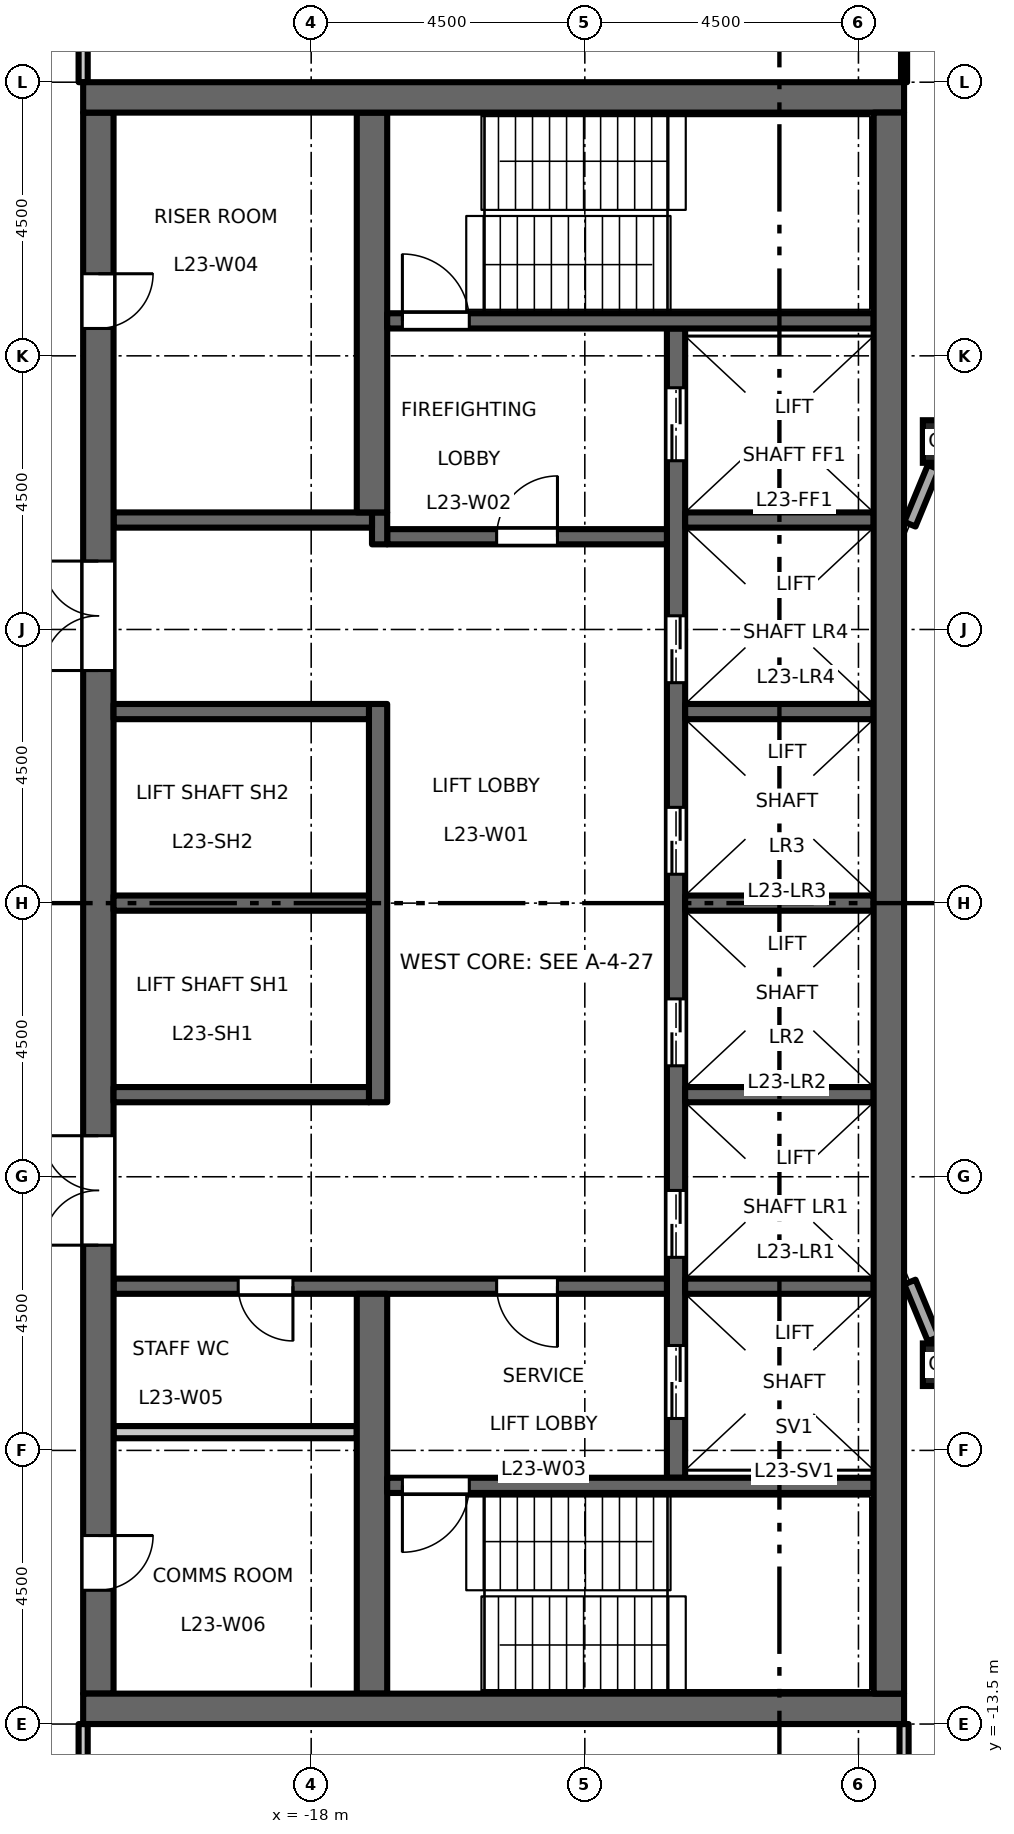
"""IFC4 building model, lengths in metres.
Left out: names, types, materials, properties, quantities, classifications, styles, units other than length and angle.
Written with IfcOpenShell. Run it as: python <this file> out.ifc"""

import sys

from ifc_helpers import new_model, si_unit, direction, frame, frame_2d, origin, origin_2d, place, context, subcontext, project, spatial, rectangle, hollow_rectangle, extrude, element, fill, save


model = new_model("IFC4")
c1 = context("Model", 3, precision=1e-05, world=origin(), true_north=direction((0.0, 1.0)))
c2 = subcontext(c1, "Body", "Model", "MODEL_VIEW")
j1 = project(units=[si_unit("LENGTHUNIT", "METRE"), si_unit("PLANEANGLEUNIT", "RADIAN")], contexts=[c1])
p1 = place(None, origin())
s1 = spatial("IfcSite", under=j1, at=p1, CompositionType="ELEMENT")
p2 = place(p1, origin())
s2 = spatial("IfcBuilding", under=s1, at=p2, CompositionType="ELEMENT")
p3 = place(p2, frame((0.0, 0.0, 109.2)))
s3 = spatial("IfcBuildingStorey", under=s2, at=p3, CompositionType="ELEMENT", Elevation=109.2)
for number, where, z_axis, x_axis in (
    (1, (-7.591, -7.591, 0.0), (0.0, 0.0, 1.0), (1.0, 0.0, 0.0)),
    (2, (-7.591, 7.591, 0.0), (0.0, 0.0, 1.0), (1.0, 0.0, 0.0)),
):
    element("IfcColumn", number, at=place(p3, frame(where, z_axis=z_axis, x_axis=x_axis)), inside=s3, PredefinedType="COLUMN", context=c2, shape_type="SweptSolid", body=[
        extrude(hollow_rectangle(XDim=0.7, YDim=0.7, WallThickness=0.04, at=origin_2d()), origin(), (0.0, 0.0, 1.0), 4.5),
    ])
p4 = place(p3, frame((-12.0, -9.45, 0.0), z_axis=(0.0, 0.0, 1.0), x_axis=(0.0, 1.0, 0.0)))
e3 = element("IfcWall", 3, at=p4, inside=s3, PredefinedType="SHEAR", context=c2, shape_type="SweptSolid", body=[
    extrude(rectangle(XDim=18.9, YDim=0.3, at=frame_2d((9.45, 0.0))), origin(), (0.0, 0.0, 1.0), 4.35),
])
p5 = place(p4, frame((3.625, 0.0, 0.0)))
e4 = element("IfcOpeningElement", 4, at=p5, cuts=e3, PredefinedType="OPENING", context=c2, shape_type="SweptSolid", body=[
    extrude(rectangle(XDim=1.1, YDim=2.1, at=frame_2d((0.55, 1.05))), frame((0.0, 0.16, 0.0), z_axis=(0.0, -1.0, 0.0), x_axis=(1.0, 0.0, 0.0)), (0.0, 0.0, 1.0), 0.32),
])
p6 = place(p4, frame((6.775, 0.0, 0.0)))
e5 = element("IfcOpeningElement", 5, at=p6, cuts=e3, PredefinedType="OPENING", context=c2, shape_type="SweptSolid", body=[
    extrude(rectangle(XDim=1.1, YDim=2.1, at=frame_2d((0.55, 1.05))), frame((0.0, 0.16, 0.0), z_axis=(0.0, -1.0, 0.0), x_axis=(1.0, 0.0, 0.0)), (0.0, 0.0, 1.0), 0.32),
])
p7 = place(p4, frame((9.925, 0.0, 0.0)))
e6 = element("IfcOpeningElement", 6, at=p7, cuts=e3, PredefinedType="OPENING", context=c2, shape_type="SweptSolid", body=[
    extrude(rectangle(XDim=1.1, YDim=2.1, at=frame_2d((0.55, 1.05))), frame((0.0, 0.16, 0.0), z_axis=(0.0, -1.0, 0.0), x_axis=(1.0, 0.0, 0.0)), (0.0, 0.0, 1.0), 0.32),
])
p8 = place(p4, frame((13.075, 0.0, 0.0)))
e7 = element("IfcOpeningElement", 7, at=p8, cuts=e3, PredefinedType="OPENING", context=c2, shape_type="SweptSolid", body=[
    extrude(rectangle(XDim=1.1, YDim=2.1, at=frame_2d((0.55, 1.05))), frame((0.0, 0.16, 0.0), z_axis=(0.0, -1.0, 0.0), x_axis=(1.0, 0.0, 0.0)), (0.0, 0.0, 1.0), 0.32),
])
p9 = place(p4, frame((16.725, 0.0, 0.0)))
e8 = element("IfcOpeningElement", 8, at=p9, cuts=e3, PredefinedType="OPENING", context=c2, shape_type="SweptSolid", body=[
    extrude(rectangle(XDim=1.2, YDim=2.1, at=frame_2d((0.6, 1.05))), frame((0.0, 0.16, 0.0), z_axis=(0.0, -1.0, 0.0), x_axis=(1.0, 0.0, 0.0)), (0.0, 0.0, 1.0), 0.32),
])
p10 = place(p4, frame((0.975, 0.0, 0.0)))
e9 = element("IfcOpeningElement", 9, at=p10, cuts=e3, PredefinedType="OPENING", context=c2, shape_type="SweptSolid", body=[
    extrude(rectangle(XDim=1.2, YDim=2.1, at=frame_2d((0.6, 1.05))), frame((0.0, 0.16, 0.0), z_axis=(0.0, -1.0, 0.0), x_axis=(1.0, 0.0, 0.0)), (0.0, 0.0, 1.0), 0.32),
])
p11 = place(p3, frame((-12.15, 6.025, 0.0), z_axis=(0.0, 0.0, 1.0), x_axis=(-1.0, 0.0, 0.0)))
e10 = element("IfcWall", 10, at=p11, inside=s3, PredefinedType="SHEAR", context=c2, shape_type="SweptSolid", body=[
    extrude(rectangle(XDim=4.6, YDim=0.25, at=frame_2d((2.3, 0.0))), origin(), (0.0, 0.0, 1.0), 4.35),
])
p12 = place(p11, frame((1.8, 0.0, 0.0)))
e11 = element("IfcOpeningElement", 11, at=p12, cuts=e10, PredefinedType="OPENING", context=c2, shape_type="SweptSolid", body=[
    extrude(rectangle(XDim=1.0, YDim=2.1, at=frame_2d((0.5, 1.05))), frame((0.0, 0.135, 0.0), z_axis=(0.0, -1.0, 0.0), x_axis=(1.0, 0.0, 0.0)), (0.0, 0.0, 1.0), 0.27),
])
p13 = place(p3, frame((-16.875, 5.9, 0.0), z_axis=(0.0, 0.0, 1.0), x_axis=(0.0, 1.0, 0.0)))
e12 = element("IfcWall", 12, at=p13, inside=s3, PredefinedType="SHEAR", context=c2, shape_type="SweptSolid", body=[
    extrude(rectangle(XDim=0.525, YDim=0.25, at=frame_2d((0.263, 0.0))), origin(), (0.0, 0.0, 1.0), 4.35),
])
p14 = place(p3, frame((-17.0, 6.3, 0.0), z_axis=(0.0, 0.0, 1.0), x_axis=(-1.0, 0.0, 0.0)))
e13 = element("IfcWall", 13, at=p14, inside=s3, PredefinedType="SHEAR", context=c2, shape_type="SweptSolid", body=[
    extrude(rectangle(XDim=4.25, YDim=0.25, at=frame_2d((2.125, 0.0))), origin(), (0.0, 0.0, 1.0), 4.35),
])
p15 = place(p3, frame((-12.15, -6.3, 0.0), z_axis=(0.0, 0.0, 1.0), x_axis=(-1.0, 0.0, 0.0)))
e14 = element("IfcWall", 14, at=p15, inside=s3, PredefinedType="SHEAR", context=c2, shape_type="SweptSolid", body=[
    extrude(rectangle(XDim=9.1, YDim=0.25, at=frame_2d((4.55, 0.0))), origin(), (0.0, 0.0, 1.0), 4.35),
])
p16 = place(p15, frame((1.8, 0.0, 0.0)))
e15 = element("IfcOpeningElement", 15, at=p16, cuts=e14, PredefinedType="OPENING", context=c2, shape_type="SweptSolid", body=[
    extrude(rectangle(XDim=1.0, YDim=2.1, at=frame_2d((0.5, 1.05))), frame((0.0, 0.135, 0.0), z_axis=(0.0, -1.0, 0.0), x_axis=(1.0, 0.0, 0.0)), (0.0, 0.0, 1.0), 0.27),
])
p17 = place(p15, frame((6.15, 0.0, 0.0)))
e16 = element("IfcOpeningElement", 16, at=p17, cuts=e14, PredefinedType="OPENING", context=c2, shape_type="SweptSolid", body=[
    extrude(rectangle(XDim=0.9, YDim=2.1, at=frame_2d((0.45, 1.05))), frame((0.0, 0.135, 0.0), z_axis=(0.0, -1.0, 0.0), x_axis=(1.0, 0.0, 0.0)), (0.0, 0.0, 1.0), 0.27),
])
p18 = place(p3, frame((-21.5, -13.0, 0.0), z_axis=(0.0, 0.0, 1.0), x_axis=(0.0, 1.0, 0.0)))
e17 = element("IfcWall", 17, at=p18, inside=s3, PredefinedType="SHEAR", context=c2, shape_type="SweptSolid", body=[
    extrude(rectangle(XDim=26.0, YDim=0.5, at=frame_2d((13.0, 0.0))), origin(), (0.0, 0.0, 1.0), 4.35),
])
p19 = place(p18, frame((16.825, 0.0, 0.0)))
e18 = element("IfcOpeningElement", 18, at=p19, cuts=e17, PredefinedType="OPENING", context=c2, shape_type="SweptSolid", body=[
    extrude(rectangle(XDim=1.8, YDim=2.1, at=frame_2d((0.9, 1.05))), frame((0.0, 0.26, 0.0), z_axis=(0.0, -1.0, 0.0), x_axis=(1.0, 0.0, 0.0)), (0.0, 0.0, 1.0), 0.52),
])
p20 = place(p18, frame((7.375, 0.0, 0.0)))
e19 = element("IfcOpeningElement", 19, at=p20, cuts=e17, PredefinedType="OPENING", context=c2, shape_type="SweptSolid", body=[
    extrude(rectangle(XDim=1.8, YDim=2.1, at=frame_2d((0.9, 1.05))), frame((0.0, 0.26, 0.0), z_axis=(0.0, -1.0, 0.0), x_axis=(1.0, 0.0, 0.0)), (0.0, 0.0, 1.0), 0.52),
])
p21 = place(p18, frame((22.45, 0.0, 0.0)))
e20 = element("IfcOpeningElement", 20, at=p21, cuts=e17, PredefinedType="OPENING", context=c2, shape_type="SweptSolid", body=[
    extrude(rectangle(XDim=0.9, YDim=2.1, at=frame_2d((0.45, 1.05))), frame((0.0, 0.26, 0.0), z_axis=(0.0, -1.0, 0.0), x_axis=(1.0, 0.0, 0.0)), (0.0, 0.0, 1.0), 0.52),
])
p22 = place(p18, frame((1.7, 0.0, 0.0)))
e21 = element("IfcOpeningElement", 21, at=p22, cuts=e17, PredefinedType="OPENING", context=c2, shape_type="SweptSolid", body=[
    extrude(rectangle(XDim=0.9, YDim=2.1, at=frame_2d((0.45, 1.05))), frame((0.0, 0.26, 0.0), z_axis=(0.0, -1.0, 0.0), x_axis=(1.0, 0.0, 0.0)), (0.0, 0.0, 1.0), 0.52),
])
p23 = place(p3, frame((-17.25, -8.7, 0.0), z_axis=(0.0, 0.0, 1.0), x_axis=(-1.0, 0.0, 0.0)))
e22 = element("IfcWall", 22, at=p23, inside=s3, PredefinedType="PARTITIONING", context=c2, shape_type="SweptSolid", body=[
    extrude(rectangle(XDim=4.0, YDim=0.2, at=frame_2d((2.0, 0.0))), origin(), (0.0, 0.0, 1.0), 4.35),
])
p24 = place(p3, frame((-16.9, -3.275, 0.0), z_axis=(0.0, 0.0, 1.0), x_axis=(0.0, 1.0, 0.0)))
e23 = element("IfcWall", 23, at=p24, inside=s3, PredefinedType="SHEAR", context=c2, shape_type="SweptSolid", body=[
    extrude(rectangle(XDim=6.55, YDim=0.3, at=frame_2d((3.275, 0.0))), origin(), (0.0, 0.0, 1.0), 4.35),
])
for number, where, z_axis, x_axis in (
    (24, (-17.05, 0.0, 0.0), (0.0, 0.0, 1.0), (-1.0, 0.0, 0.0)),
    (25, (-17.05, 3.15, 0.0), (0.0, 0.0, 1.0), (-1.0, 0.0, 0.0)),
    (26, (-17.05, -3.15, 0.0), (0.0, 0.0, 1.0), (-1.0, 0.0, 0.0)),
):
    element("IfcWall", number, at=place(p3, frame(where, z_axis=z_axis, x_axis=x_axis)), inside=s3, PredefinedType="SHEAR", context=c2, shape_type="SweptSolid", body=[
        extrude(rectangle(XDim=4.2, YDim=0.25, at=frame_2d((2.1, 0.0))), origin(), (0.0, 0.0, 1.0), 4.35),
    ])
for number, where, z_axis, x_axis in (
    (27, (-17.0, 6.425, 0.0), (0.0, 0.0, 1.0), (0.0, 1.0, 0.0)),
    (28, (-17.0, -13.0, 0.0), (0.0, 0.0, 1.0), (0.0, 1.0, 0.0)),
):
    element("IfcWall", number, at=place(p3, frame(where, z_axis=z_axis, x_axis=x_axis)), inside=s3, PredefinedType="SHEAR", context=c2, shape_type="SweptSolid", body=[
        extrude(rectangle(XDim=6.575, YDim=0.5, at=frame_2d((3.288, 0.0))), origin(), (0.0, 0.0, 1.0), 4.35),
    ])
for number, where, z_axis, x_axis in (
    (29, (-8.75, 0.0, 0.0), (0.0, 0.0, 1.0), (-1.0, 0.0, 0.0)),
    (30, (-8.75, 3.15, 0.0), (0.0, 0.0, 1.0), (-1.0, 0.0, 0.0)),
    (31, (-8.75, 6.3, 0.0), (0.0, 0.0, 1.0), (-1.0, 0.0, 0.0)),
    (32, (-8.75, -3.15, 0.0), (0.0, 0.0, 1.0), (-1.0, 0.0, 0.0)),
    (33, (-8.75, -6.3, 0.0), (0.0, 0.0, 1.0), (-1.0, 0.0, 0.0)),
):
    element("IfcWall", number, at=place(p3, frame(where, z_axis=z_axis, x_axis=x_axis)), inside=s3, PredefinedType="SHEAR", context=c2, shape_type="SweptSolid", body=[
        extrude(rectangle(XDim=3.1, YDim=0.25, at=frame_2d((1.55, 0.0))), origin(), (0.0, 0.0, 1.0), 4.35),
    ])
p25 = place(p3, frame((-8.75, 9.575, 0.0), z_axis=(0.0, 0.0, 1.0), x_axis=(-1.0, 0.0, 0.0)))
e34 = element("IfcWall", 34, at=p25, inside=s3, PredefinedType="SHEAR", context=c2, shape_type="SweptSolid", body=[
    extrude(rectangle(XDim=8.0, YDim=0.25, at=frame_2d((4.0, 0.0))), origin(), (0.0, 0.0, 1.0), 4.35),
])
p26 = place(p25, frame((6.65, 0.0, 0.0)))
e35 = element("IfcOpeningElement", 35, at=p26, cuts=e34, PredefinedType="OPENING", context=c2, shape_type="SweptSolid", body=[
    extrude(rectangle(XDim=1.1, YDim=2.1, at=frame_2d((0.55, 1.05))), frame((0.0, 0.135, 0.0), z_axis=(0.0, -1.0, 0.0), x_axis=(1.0, 0.0, 0.0)), (0.0, 0.0, 1.0), 0.27),
])
p27 = place(p3, frame((-8.75, -9.575, 0.0), z_axis=(0.0, 0.0, 1.0), x_axis=(-1.0, 0.0, 0.0)))
e36 = element("IfcWall", 36, at=p27, inside=s3, PredefinedType="SHEAR", context=c2, shape_type="SweptSolid", body=[
    extrude(rectangle(XDim=8.0, YDim=0.25, at=frame_2d((4.0, 0.0))), origin(), (0.0, 0.0, 1.0), 4.35),
])
p28 = place(p27, frame((6.65, 0.0, 0.0)))
e37 = element("IfcOpeningElement", 37, at=p28, cuts=e36, PredefinedType="OPENING", context=c2, shape_type="SweptSolid", body=[
    extrude(rectangle(XDim=1.1, YDim=2.1, at=frame_2d((0.55, 1.05))), frame((0.0, 0.135, 0.0), z_axis=(0.0, -1.0, 0.0), x_axis=(1.0, 0.0, 0.0)), (0.0, 0.0, 1.0), 0.27),
])
for number, where, z_axis, x_axis in (
    (38, (-8.25, 13.25, 0.0), (0.0, 0.0, 1.0), (-1.0, 0.0, 0.0)),
    (39, (-8.25, -13.25, 0.0), (0.0, 0.0, 1.0), (-1.0, 0.0, 0.0)),
):
    element("IfcWall", number, at=place(p3, frame(where, z_axis=z_axis, x_axis=x_axis)), inside=s3, PredefinedType="SHEAR", context=c2, shape_type="SweptSolid", body=[
        extrude(rectangle(XDim=13.5, YDim=0.5, at=frame_2d((6.75, 0.0))), origin(), (0.0, 0.0, 1.0), 4.35),
    ])
p29 = place(p3, frame((-8.5, -13.0, 0.0), z_axis=(0.0, 0.0, 1.0), x_axis=(0.0, 1.0, 0.0)))
e40 = element("IfcWall", 40, at=p29, inside=s3, PredefinedType="SHEAR", context=c2, shape_type="SweptSolid", body=[
    extrude(rectangle(XDim=26.0, YDim=0.5, at=frame_2d((13.0, 0.0))), origin(), (0.0, 0.0, 1.0), 4.35),
])
for number, where, z_axis, x_axis in (
    (41, (-7.766, 7.168, 0.0), (0.0, 0.0, 1.0), (-0.383, -0.924, 0.0)),
    (42, (-8.154, -6.231, 0.0), (0.0, 0.0, 1.0), (0.383, -0.924, 0.0)),
):
    element("IfcWall", number, at=place(p3, frame(where, z_axis=z_axis, x_axis=x_axis)), inside=s3, PredefinedType="STANDARD", context=c2, shape_type="SweptSolid", body=[
        extrude(rectangle(XDim=1.015, YDim=0.2, at=frame_2d((0.507, 0.0))), origin(), (0.0, 0.0, 1.0), 3.826),
    ])
for number, where, z_axis, x_axis in (
    (43, (-21.75, -16.925, 0.0), (0.0, 0.0, 1.0), (0.0, 1.0, 0.0)),
    (44, (-21.75, 13.5, 0.0), (0.0, 0.0, 1.0), (0.0, 1.0, 0.0)),
):
    element("IfcWall", number, at=place(p3, frame(where, z_axis=z_axis, x_axis=x_axis)), inside=s3, PredefinedType="PARTITIONING", context=c2, shape_type="SweptSolid", body=[
        extrude(rectangle(XDim=3.425, YDim=0.15, at=frame_2d((1.712, 0.0))), origin(), (0.0, 0.0, 1.0), 4.35),
    ])
p30 = place(p3, frame((-8.25, 13.5, 0.0), z_axis=(0.0, 0.0, 1.0), x_axis=(0.0, 1.0, 0.0)))
e45 = element("IfcWall", 45, at=p30, inside=s3, PredefinedType="PARTITIONING", context=c2, shape_type="SweptSolid", body=[
    extrude(rectangle(XDim=3.425, YDim=0.1, at=frame_2d((1.712, 0.0))), origin(), (0.0, 0.0, 1.0), 4.35),
])
p31 = place(p3, frame((-8.25, -16.925, 0.0), z_axis=(0.0, 0.0, 1.0), x_axis=(0.0, 1.0, 0.0)))
e46 = element("IfcWall", 46, at=p31, inside=s3, PredefinedType="PARTITIONING", context=c2, shape_type="SweptSolid", body=[
    extrude(rectangle(XDim=3.425, YDim=0.15, at=frame_2d((1.712, 0.0))), origin(), (0.0, 0.0, 1.0), 4.35),
])
p32 = place(p12, origin())
e47 = element("IfcDoor", 47, at=p32, inside=s3, OperationType="SINGLE_SWING_LEFT", PredefinedType="DOOR", context=c2, shape_type="SweptSolid", body=[
    extrude(rectangle(XDim=1.0, YDim=2.1, at=frame_2d((0.5, 1.05))), frame((0.0, 0.025, 0.0), z_axis=(0.0, -1.0, 0.0), x_axis=(1.0, 0.0, 0.0)), (0.0, 0.0, 1.0), 0.05),
])
fill(e11, e47)
p33 = place(p16, origin())
e48 = element("IfcDoor", 48, at=p33, inside=s3, OperationType="SINGLE_SWING_RIGHT", PredefinedType="DOOR", context=c2, shape_type="SweptSolid", body=[
    extrude(rectangle(XDim=1.0, YDim=2.1, at=frame_2d((0.5, 1.05))), frame((0.0, 0.025, 0.0), z_axis=(0.0, -1.0, 0.0), x_axis=(1.0, 0.0, 0.0)), (0.0, 0.0, 1.0), 0.05),
])
fill(e15, e48)
p34 = place(p26, origin())
e49 = element("IfcDoor", 49, at=p34, inside=s3, OperationType="SINGLE_SWING_RIGHT", PredefinedType="DOOR", context=c2, shape_type="SweptSolid", body=[
    extrude(rectangle(XDim=1.1, YDim=2.1, at=frame_2d((0.55, 1.05))), frame((0.0, 0.025, 0.0), z_axis=(0.0, -1.0, 0.0), x_axis=(1.0, 0.0, 0.0)), (0.0, 0.0, 1.0), 0.05),
])
fill(e35, e49)
p35 = place(p28, origin())
e50 = element("IfcDoor", 50, at=p35, inside=s3, OperationType="SINGLE_SWING_LEFT", PredefinedType="DOOR", context=c2, shape_type="SweptSolid", body=[
    extrude(rectangle(XDim=1.1, YDim=2.1, at=frame_2d((0.55, 1.05))), frame((0.0, 0.025, 0.0), z_axis=(0.0, -1.0, 0.0), x_axis=(1.0, 0.0, 0.0)), (0.0, 0.0, 1.0), 0.05),
])
fill(e37, e50)
p36 = place(p19, origin())
e51 = element("IfcDoor", 51, at=p36, inside=s3, OperationType="DOUBLE_DOOR_DOUBLE_SWING", PredefinedType="DOOR", context=c2, shape_type="SweptSolid", body=[
    extrude(rectangle(XDim=1.8, YDim=2.1, at=frame_2d((0.9, 1.05))), frame((0.0, 0.025, 0.0), z_axis=(0.0, -1.0, 0.0), x_axis=(1.0, 0.0, 0.0)), (0.0, 0.0, 1.0), 0.05),
])
fill(e18, e51)
p37 = place(p20, origin())
e52 = element("IfcDoor", 52, at=p37, inside=s3, OperationType="DOUBLE_DOOR_DOUBLE_SWING", PredefinedType="DOOR", context=c2, shape_type="SweptSolid", body=[
    extrude(rectangle(XDim=1.8, YDim=2.1, at=frame_2d((0.9, 1.05))), frame((0.0, 0.025, 0.0), z_axis=(0.0, -1.0, 0.0), x_axis=(1.0, 0.0, 0.0)), (0.0, 0.0, 1.0), 0.05),
])
fill(e19, e52)
p38 = place(p5, origin())
e53 = element("IfcDoor", 53, at=p38, inside=s3, OperationType="DOUBLE_DOOR_SLIDING", PredefinedType="DOOR", context=c2, shape_type="SweptSolid", body=[
    extrude(rectangle(XDim=1.1, YDim=2.1, at=frame_2d((0.55, 1.05))), frame((0.0, 0.025, 0.0), z_axis=(0.0, -1.0, 0.0), x_axis=(1.0, 0.0, 0.0)), (0.0, 0.0, 1.0), 0.05),
])
fill(e4, e53)
p39 = place(p6, origin())
e54 = element("IfcDoor", 54, at=p39, inside=s3, OperationType="DOUBLE_DOOR_SLIDING", PredefinedType="DOOR", context=c2, shape_type="SweptSolid", body=[
    extrude(rectangle(XDim=1.1, YDim=2.1, at=frame_2d((0.55, 1.05))), frame((0.0, 0.025, 0.0), z_axis=(0.0, -1.0, 0.0), x_axis=(1.0, 0.0, 0.0)), (0.0, 0.0, 1.0), 0.05),
])
fill(e5, e54)
p40 = place(p7, origin())
e55 = element("IfcDoor", 55, at=p40, inside=s3, OperationType="DOUBLE_DOOR_SLIDING", PredefinedType="DOOR", context=c2, shape_type="SweptSolid", body=[
    extrude(rectangle(XDim=1.1, YDim=2.1, at=frame_2d((0.55, 1.05))), frame((0.0, 0.025, 0.0), z_axis=(0.0, -1.0, 0.0), x_axis=(1.0, 0.0, 0.0)), (0.0, 0.0, 1.0), 0.05),
])
fill(e6, e55)
p41 = place(p8, origin())
e56 = element("IfcDoor", 56, at=p41, inside=s3, OperationType="DOUBLE_DOOR_SLIDING", PredefinedType="DOOR", context=c2, shape_type="SweptSolid", body=[
    extrude(rectangle(XDim=1.1, YDim=2.1, at=frame_2d((0.55, 1.05))), frame((0.0, 0.025, 0.0), z_axis=(0.0, -1.0, 0.0), x_axis=(1.0, 0.0, 0.0)), (0.0, 0.0, 1.0), 0.05),
])
fill(e7, e56)
p42 = place(p9, origin())
e57 = element("IfcDoor", 57, at=p42, inside=s3, OperationType="DOUBLE_DOOR_SLIDING", PredefinedType="DOOR", context=c2, shape_type="SweptSolid", body=[
    extrude(rectangle(XDim=1.2, YDim=2.1, at=frame_2d((0.6, 1.05))), frame((0.0, 0.025, 0.0), z_axis=(0.0, -1.0, 0.0), x_axis=(1.0, 0.0, 0.0)), (0.0, 0.0, 1.0), 0.05),
])
fill(e8, e57)
p43 = place(p10, origin())
e58 = element("IfcDoor", 58, at=p43, inside=s3, OperationType="DOUBLE_DOOR_SLIDING", PredefinedType="DOOR", context=c2, shape_type="SweptSolid", body=[
    extrude(rectangle(XDim=1.2, YDim=2.1, at=frame_2d((0.6, 1.05))), frame((0.0, 0.025, 0.0), z_axis=(0.0, -1.0, 0.0), x_axis=(1.0, 0.0, 0.0)), (0.0, 0.0, 1.0), 0.05),
])
fill(e9, e58)
p44 = place(p21, origin())
e59 = element("IfcDoor", 59, at=p44, inside=s3, OperationType="SINGLE_SWING_RIGHT", PredefinedType="DOOR", context=c2, shape_type="SweptSolid", body=[
    extrude(rectangle(XDim=0.9, YDim=2.1, at=frame_2d((0.45, 1.05))), frame((0.0, 0.025, 0.0), z_axis=(0.0, -1.0, 0.0), x_axis=(1.0, 0.0, 0.0)), (0.0, 0.0, 1.0), 0.05),
])
fill(e20, e59)
p45 = place(p17, origin())
e60 = element("IfcDoor", 60, at=p45, inside=s3, OperationType="SINGLE_SWING_RIGHT", PredefinedType="DOOR", context=c2, shape_type="SweptSolid", body=[
    extrude(rectangle(XDim=0.9, YDim=2.1, at=frame_2d((0.45, 1.05))), frame((0.0, 0.025, 0.0), z_axis=(0.0, -1.0, 0.0), x_axis=(1.0, 0.0, 0.0)), (0.0, 0.0, 1.0), 0.05),
])
fill(e16, e60)
p46 = place(p22, origin())
e61 = element("IfcDoor", 61, at=p46, inside=s3, OperationType="SINGLE_SWING_RIGHT", PredefinedType="DOOR", context=c2, shape_type="SweptSolid", body=[
    extrude(rectangle(XDim=0.9, YDim=2.1, at=frame_2d((0.45, 1.05))), frame((0.0, 0.025, 0.0), z_axis=(0.0, -1.0, 0.0), x_axis=(1.0, 0.0, 0.0)), (0.0, 0.0, 1.0), 0.05),
])
fill(e21, e61)
save(model, sys.argv[1])
